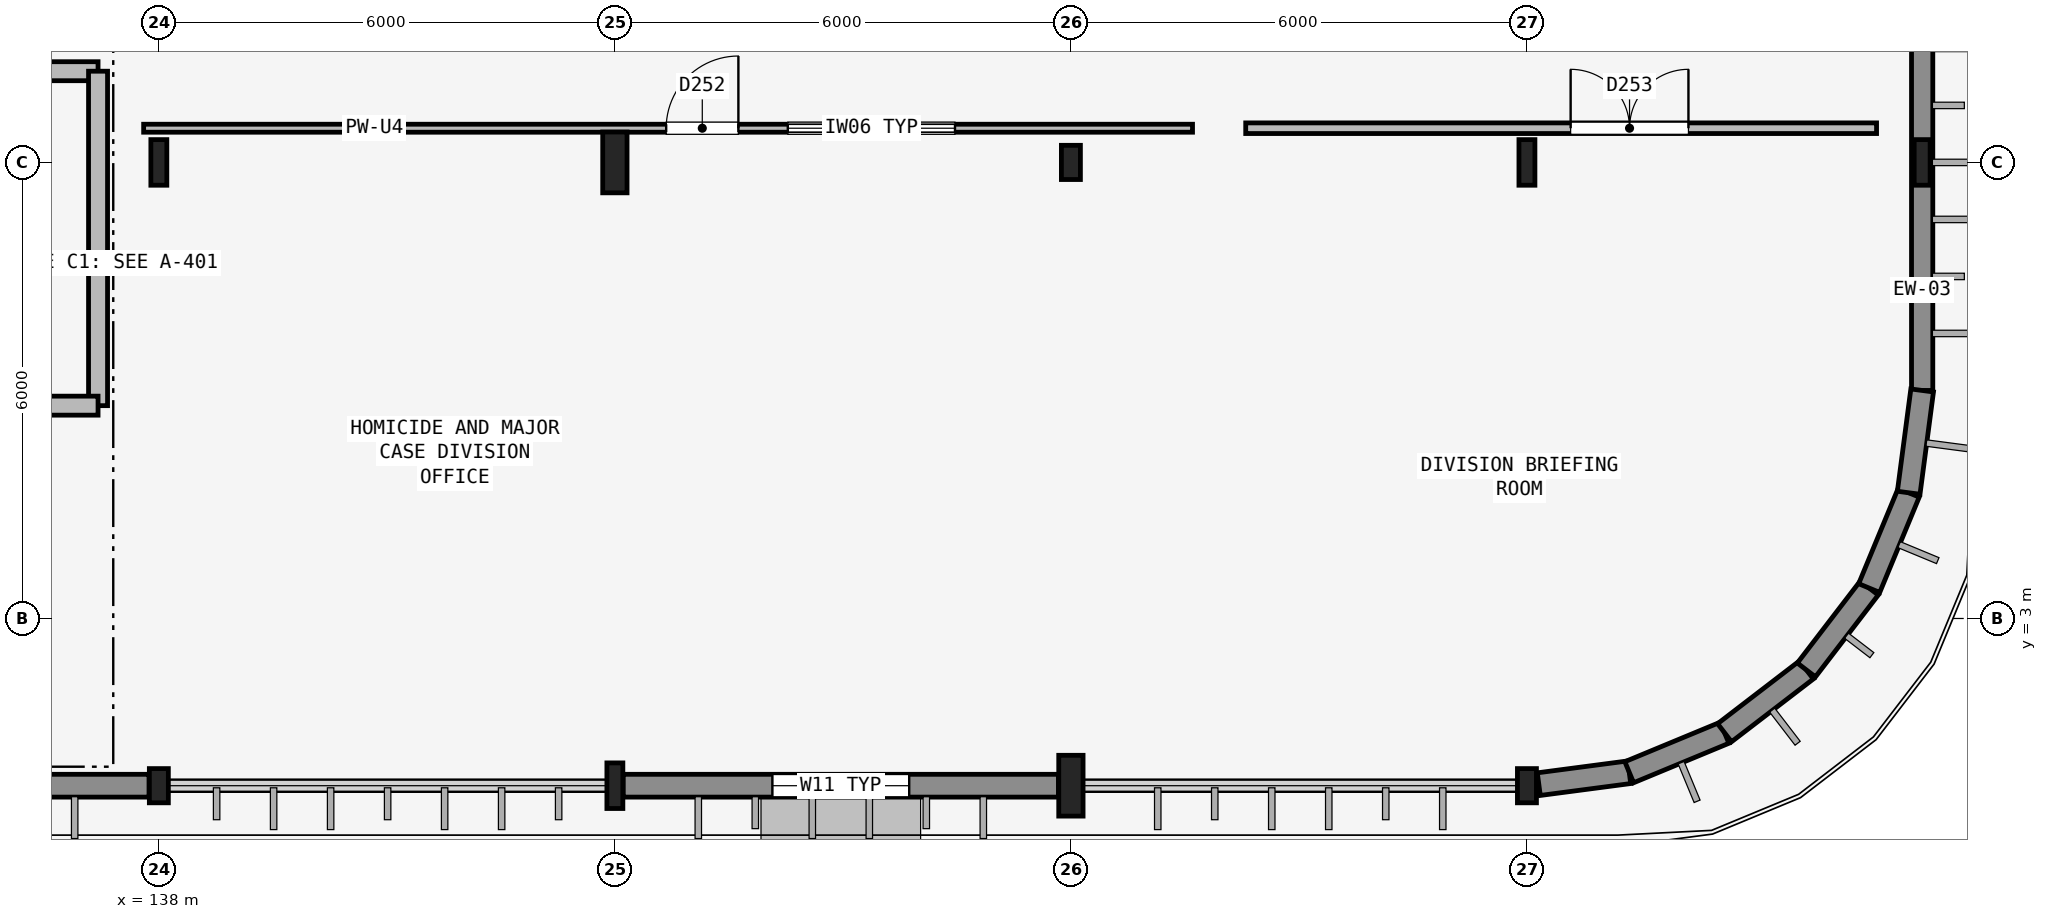
"""IFC4 building model, lengths in metres.
Left out: names, types, materials, properties, quantities, classifications, styles, units other than length and angle.
Written with IfcOpenShell. Run it as: python <this file> out.ifc"""

import sys

from ifc_helpers import new_model, si_unit, direction, frame, frame_2d, origin, origin_2d, place, context, subcontext, project, spatial, rectangle, i_section, extrude, element, fill, save


model = new_model("IFC4")
c1 = context("Model", 3, precision=1e-05, world=origin(), true_north=direction((0.0, 1.0)))
c2 = subcontext(c1, "Body", "Model", "MODEL_VIEW")
j1 = project(units=[si_unit("LENGTHUNIT", "METRE"), si_unit("PLANEANGLEUNIT", "RADIAN")], contexts=[c1])
p1 = place(None, origin())
s1 = spatial("IfcSite", under=j1, at=p1, CompositionType="ELEMENT")
p2 = place(p1, origin())
s2 = spatial("IfcBuilding", under=s1, at=p2, CompositionType="ELEMENT")
p3 = place(p2, frame((0.0, 0.0, 13.5)))
s3 = spatial("IfcBuildingStorey", under=s2, at=p3, CompositionType="ELEMENT", Elevation=13.5)
p4 = place(p3, frame((138.0, 0.8, 0.0), z_axis=(0.0, 0.0, 1.0), x_axis=(1.0, 0.0, 0.0)))
e1 = element("IfcColumn", 1, at=p4, inside=s3, PredefinedType="COLUMN", context=c2, shape_type="SweptSolid", body=[
    extrude(i_section(OverallWidth=0.25, OverallDepth=0.45, WebThickness=0.011, FlangeThickness=0.014, FilletRadius=0.015, at=origin_2d()), origin(), (0.0, 0.0, 1.0), 4.5),
])
for number, where, z_axis, x_axis in (
    (2, (138.0, 9.0, 0.0), (0.0, 0.0, 1.0), (1.0, 0.0, 0.0)),
    (3, (144.0, 0.8, 0.0), (0.0, 0.0, 1.0), (1.0, 0.0, 0.0)),
):
    element("IfcColumn", number, at=place(p3, frame(where, z_axis=z_axis, x_axis=x_axis)), inside=s3, PredefinedType="COLUMN", context=c2, shape_type="SweptSolid", body=[
        extrude(i_section(OverallWidth=0.21, OverallDepth=0.6, WebThickness=0.012, FlangeThickness=0.021, FilletRadius=0.02, at=origin_2d()), origin(), (0.0, 0.0, 1.0), 4.5),
    ])
for number, where, z_axis, x_axis in (
    (4, (144.0, 9.0, 0.0), (0.0, 0.0, 1.0), (1.0, 0.0, 0.0)),
    (5, (150.0, 0.8, 0.0), (0.0, 0.0, 1.0), (1.0, 0.0, 0.0)),
):
    element("IfcColumn", number, at=place(p3, frame(where, z_axis=z_axis, x_axis=x_axis)), inside=s3, PredefinedType="COLUMN", context=c2, shape_type="SweptSolid", body=[
        extrude(i_section(OverallWidth=0.32, OverallDepth=0.8, WebThickness=0.016, FlangeThickness=0.028, at=origin_2d()), origin(), (0.0, 0.0, 1.0), 4.5),
    ])
for number, where, z_axis, x_axis in (
    (6, (150.0, 9.0, 0.0), (0.0, 0.0, 1.0), (1.0, 0.0, 0.0)),
    (7, (156.0, 0.8, 0.0), (0.0, 0.0, 1.0), (1.0, 0.0, 0.0)),
):
    element("IfcColumn", number, at=place(p3, frame(where, z_axis=z_axis, x_axis=x_axis)), inside=s3, PredefinedType="COLUMN", context=c2, shape_type="SweptSolid", body=[
        extrude(i_section(OverallWidth=0.25, OverallDepth=0.45, WebThickness=0.011, FlangeThickness=0.014, FilletRadius=0.015, at=origin_2d()), origin(), (0.0, 0.0, 1.0), 4.5),
    ])
for number, where, z_axis, x_axis in (
    (8, (156.0, 9.0, 0.0), (0.0, 0.0, 1.0), (1.0, 0.0, 0.0)),
    (9, (161.2, 9.0, 0.0), (0.0, 0.0, 1.0), (1.0, 0.0, 0.0)),
):
    element("IfcColumn", number, at=place(p3, frame(where, z_axis=z_axis, x_axis=x_axis)), inside=s3, PredefinedType="COLUMN", context=c2, shape_type="SweptSolid", body=[
        extrude(i_section(OverallWidth=0.21, OverallDepth=0.6, WebThickness=0.012, FlangeThickness=0.021, FilletRadius=0.02, at=origin_2d()), origin(), (0.0, 0.0, 1.0), 4.5),
    ])
p5 = place(p3, frame((132.164, 0.8, 0.0), z_axis=(0.0, 0.0, 1.0), x_axis=(1.0, 0.0, 0.0)))
e10 = element("IfcWall", 10, at=p5, inside=s3, PredefinedType="SOLIDWALL", context=c2, shape_type="SweptSolid", body=[
    extrude(rectangle(XDim=5.707, YDim=0.3, at=frame_2d((2.854, 0.0))), origin(), (0.0, 0.0, 1.0), 3.84),
])
p6 = place(p5, frame((1.803, 0.0, 0.9)))
e11 = element("IfcOpeningElement", 11, at=p6, cuts=e10, PredefinedType="OPENING", context=c2, shape_type="SweptSolid", body=[
    extrude(rectangle(XDim=2.1, YDim=1.5, at=frame_2d((1.05, 0.75))), frame((0.0, 0.16, 0.0), z_axis=(0.0, -1.0, 0.0), x_axis=(1.0, 0.0, 0.0)), (0.0, 0.0, 1.0), 0.32),
])
p7 = place(p3, frame((144.109, 0.8, 0.0), z_axis=(0.0, 0.0, 1.0), x_axis=(1.0, 0.0, 0.0)))
e12 = element("IfcWall", 12, at=p7, inside=s3, PredefinedType="SOLIDWALL", context=c2, shape_type="SweptSolid", body=[
    extrude(rectangle(XDim=5.727, YDim=0.3, at=frame_2d((2.864, 0.0))), origin(), (0.0, 0.0, 1.0), 3.84),
])
p8 = place(p7, frame((1.963, 0.0, 0.6)))
e13 = element("IfcOpeningElement", 13, at=p8, cuts=e12, PredefinedType="OPENING", context=c2, shape_type="SweptSolid", body=[
    extrude(rectangle(XDim=1.8, YDim=2.2, at=frame_2d((0.9, 1.1))), frame((0.0, 0.16, 0.0), z_axis=(0.0, -1.0, 0.0), x_axis=(1.0, 0.0, 0.0)), (0.0, 0.0, 1.0), 0.32),
])
p9 = place(p3, frame((161.2, 6.0, 0.0), z_axis=(0.0, 0.0, 1.0), x_axis=(0.0, 1.0, 0.0)))
e14 = element("IfcWall", 14, at=p9, inside=s3, PredefinedType="SOLIDWALL", context=c2, shape_type="SweptSolid", body=[
    extrude(rectangle(XDim=6.0, YDim=0.28, at=frame_2d((3.0, 0.0))), origin(), (0.0, 0.0, 1.0), 3.59),
])
p10 = place(p3, frame((156.156, 0.821, 0.0), z_axis=(0.0, 0.0, 1.0), x_axis=(0.991436284929, 0.130591320255, 0.0)))
e15 = element("IfcWall", 15, at=p10, inside=s3, PredefinedType="SOLIDWALL", context=c2, shape_type="SweptSolid", body=[
    extrude(rectangle(XDim=1.2, YDim=0.3, at=frame_2d((0.6, 0.0))), origin(), (0.0, 0.0, 1.0), 3.866),
])
for number, where, z_axis, x_axis in (
    (16, (157.346, 0.977, 0.0), (0.0, 0.0, 1.0), (0.924, 0.383, 0.0)),
    (17, (158.6, 1.497, 0.0), (0.0, 0.0, 1.0), (0.793, 0.609, 0.0)),
    (18, (159.677, 2.323, 0.0), (0.0, 0.0, 1.0), (0.609, 0.793, 0.0)),
    (19, (160.503, 3.4, 0.0), (0.0, 0.0, 1.0), (0.383, 0.924, 0.0)),
):
    element("IfcWall", number, at=place(p3, frame(where, z_axis=z_axis, x_axis=x_axis)), inside=s3, PredefinedType="SOLIDWALL", context=c2, shape_type="SweptSolid", body=[
        extrude(rectangle(XDim=1.357, YDim=0.3, at=frame_2d((0.679, 0.0))), origin(), (0.0, 0.0, 1.0), 4.195),
    ])
p11 = place(p3, frame((161.023, 4.654, 0.0), z_axis=(0.0, 0.0, 1.0), x_axis=(0.130561507967, 0.991440211328, 0.0)))
e20 = element("IfcWall", 20, at=p11, inside=s3, PredefinedType="SOLIDWALL", context=c2, shape_type="SweptSolid", body=[
    extrude(rectangle(XDim=1.358, YDim=0.3, at=frame_2d((0.679, 0.0))), origin(), (0.0, 0.0, 1.0), 4.195),
])
p12 = place(p3, frame((131.55, 10.2, 0.0), z_axis=(0.0, 0.0, 1.0), x_axis=(1.0, 0.0, 0.0)))
e21 = element("IfcWall", 21, at=p12, inside=s3, PredefinedType="PARTITIONING", context=c2, shape_type="SweptSolid", body=[
    extrude(rectangle(XDim=5.65, YDim=0.25, at=frame_2d((2.825, 0.0))), origin(), (0.0, 0.0, 1.0), 3.69),
])
p13 = place(p12, frame((2.075, 0.0, 0.0)))
e22 = element("IfcOpeningElement", 22, at=p13, cuts=e21, PredefinedType="OPENING", context=c2, shape_type="SweptSolid", body=[
    extrude(rectangle(XDim=1.5, YDim=2.15, at=frame_2d((0.75, 1.075))), frame((0.0, 0.135, 0.0), z_axis=(0.0, -1.0, 0.0), x_axis=(1.0, 0.0, 0.0)), (0.0, 0.0, 1.0), 0.27),
])
p14 = place(p3, frame((137.2, 5.8, 0.0), z_axis=(0.0, 0.0, 1.0), x_axis=(0.0, 1.0, 0.0)))
e23 = element("IfcWall", 23, at=p14, inside=s3, PredefinedType="PARTITIONING", context=c2, shape_type="SweptSolid", body=[
    extrude(rectangle(XDim=4.4, YDim=0.25, at=frame_2d((2.2, 0.0))), origin(), (0.0, 0.0, 1.0), 3.59),
])
p15 = place(p3, frame((135.6, 5.8, 0.0), z_axis=(0.0, 0.0, 1.0), x_axis=(1.0, 0.0, 0.0)))
e24 = element("IfcWall", 24, at=p15, inside=s3, PredefinedType="PARTITIONING", context=c2, shape_type="SweptSolid", body=[
    extrude(rectangle(XDim=1.6, YDim=0.25, at=frame_2d((0.8, 0.0))), origin(), (0.0, 0.0, 1.0), 4.19),
])
p16 = place(p3, frame((137.8, 9.45, 0.0), z_axis=(0.0, 0.0, 1.0), x_axis=(1.0, 0.0, 0.0)))
e25 = element("IfcWall", 25, at=p16, inside=s3, PredefinedType="PARTITIONING", context=c2, shape_type="SweptSolid", body=[
    extrude(rectangle(XDim=13.8, YDim=0.105, at=frame_2d((6.9, 0.0))), origin(), (0.0, 0.0, 1.0), 3.69),
])
p17 = place(p16, frame((6.875, 0.0, 0.0)))
e26 = element("IfcOpeningElement", 26, at=p17, cuts=e25, PredefinedType="OPENING", context=c2, shape_type="SweptSolid", body=[
    extrude(rectangle(XDim=0.95, YDim=2.15, at=frame_2d((0.475, 1.075))), frame((0.0, 0.062, 0.0), z_axis=(0.0, -1.0, 0.0), x_axis=(1.0, 0.0, 0.0)), (0.0, 0.0, 1.0), 0.125),
])
p18 = place(p16, frame((8.475, 0.0, 0.9)))
e27 = element("IfcOpeningElement", 27, at=p18, cuts=e25, PredefinedType="OPENING", context=c2, shape_type="SweptSolid", body=[
    extrude(rectangle(XDim=2.2, YDim=1.4, at=frame_2d((1.1, 0.7))), frame((0.0, 0.062, 0.0), z_axis=(0.0, -1.0, 0.0), x_axis=(1.0, 0.0, 0.0)), (0.0, 0.0, 1.0), 0.125),
])
p19 = place(p3, frame((152.3, 9.45, 0.0), z_axis=(0.0, 0.0, 1.0), x_axis=(1.0, 0.0, 0.0)))
e28 = element("IfcWall", 28, at=p19, inside=s3, PredefinedType="PARTITIONING", context=c2, shape_type="SweptSolid", body=[
    extrude(rectangle(XDim=8.3, YDim=0.14, at=frame_2d((4.15, 0.0))), origin(), (0.0, 0.0, 1.0), 3.69),
])
p20 = place(p19, frame((4.275, 0.0, 0.0)))
e29 = element("IfcOpeningElement", 29, at=p20, cuts=e28, PredefinedType="OPENING", context=c2, shape_type="SweptSolid", body=[
    extrude(rectangle(XDim=1.55, YDim=2.2, at=frame_2d((0.775, 1.1))), frame((0.0, 0.08, 0.0), z_axis=(0.0, -1.0, 0.0), x_axis=(1.0, 0.0, 0.0)), (0.0, 0.0, 1.0), 0.16),
])
p21 = place(p8, origin())
e30 = element("IfcWindow", 30, at=p21, inside=s3, PartitioningType="SINGLE_PANEL", PredefinedType="WINDOW", context=c2, shape_type="SweptSolid", body=[
    extrude(rectangle(XDim=1.8, YDim=2.2, at=frame_2d((0.9, 1.1))), frame((0.0, 0.03, 0.0), z_axis=(0.0, -1.0, 0.0), x_axis=(1.0, 0.0, 0.0)), (0.0, 0.0, 1.0), 0.06),
])
fill(e13, e30)
p22 = place(p17, origin())
e31 = element("IfcDoor", 31, at=p22, inside=s3, OperationType="SINGLE_SWING_RIGHT", PredefinedType="DOOR", context=c2, shape_type="SweptSolid", body=[
    extrude(rectangle(XDim=0.95, YDim=2.15, at=frame_2d((0.475, 1.075))), frame((0.0, 0.025, 0.0), z_axis=(0.0, -1.0, 0.0), x_axis=(1.0, 0.0, 0.0)), (0.0, 0.0, 1.0), 0.05),
])
fill(e26, e31)
p23 = place(p18, origin())
e32 = element("IfcWindow", 32, at=p23, inside=s3, PartitioningType="SINGLE_PANEL", PredefinedType="WINDOW", context=c2, shape_type="SweptSolid", body=[
    extrude(rectangle(XDim=2.2, YDim=1.4, at=frame_2d((1.1, 0.7))), frame((0.0, 0.03, 0.0), z_axis=(0.0, -1.0, 0.0), x_axis=(1.0, 0.0, 0.0)), (0.0, 0.0, 1.0), 0.06),
])
fill(e27, e32)
p24 = place(p20, origin())
e33 = element("IfcDoor", 33, at=p24, inside=s3, OperationType="DOUBLE_DOOR_SINGLE_SWING", PredefinedType="DOOR", context=c2, shape_type="SweptSolid", body=[
    extrude(rectangle(XDim=1.55, YDim=2.2, at=frame_2d((0.775, 1.1))), frame((0.0, 0.025, 0.0), z_axis=(0.0, -1.0, 0.0), x_axis=(1.0, 0.0, 0.0)), (0.0, 0.0, 1.0), 0.05),
])
fill(e29, e33)
save(model, sys.argv[1])
